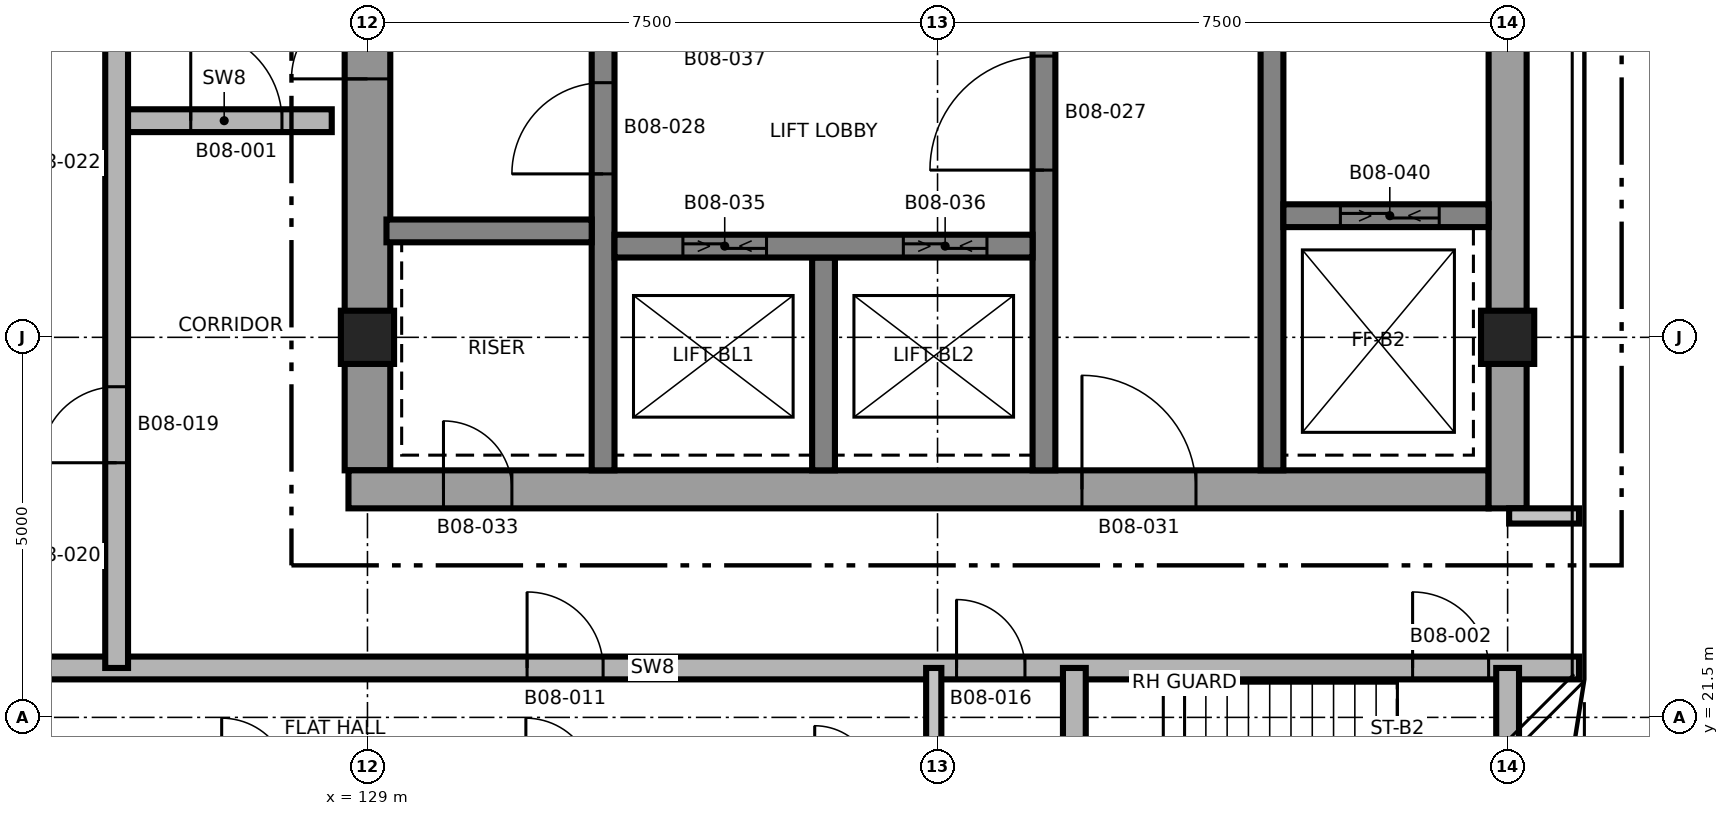
"""IFC4 building model, lengths in metres.
Left out: names, types, materials, properties, quantities, classifications, styles, units other than length and angle.
Written with IfcOpenShell. Run it as: python <this file> out.ifc"""

import sys

from ifc_helpers import new_model, si_unit, direction, frame, frame_2d, origin, origin_2d, place, context, subcontext, project, spatial, rectangle, extrude, element, fill, save


model = new_model("IFC4")
c1 = context("Model", 3, precision=1e-05, world=origin(), true_north=direction((0.0, 1.0)))
c2 = subcontext(c1, "Body", "Model", "MODEL_VIEW")
j1 = project(units=[si_unit("LENGTHUNIT", "METRE"), si_unit("PLANEANGLEUNIT", "RADIAN")], contexts=[c1])
p1 = place(None, origin())
s1 = spatial("IfcSite", under=j1, at=p1, CompositionType="ELEMENT")
p2 = place(p1, origin())
s2 = spatial("IfcBuilding", under=s1, at=p2, CompositionType="ELEMENT")
p3 = place(p2, frame((0.0, 0.0, 94.5)))
s3 = spatial("IfcBuildingStorey", under=s2, at=p3, CompositionType="ELEMENT", Elevation=94.5)
p4 = place(p3, frame((129.0, 24.75, 0.0), z_axis=(0.0, 0.0, 1.0), x_axis=(0.0, 1.0, 0.0)))
e1 = element("IfcWall", 1, at=p4, inside=s3, PredefinedType="SHEAR", context=c2, shape_type="SweptSolid", body=[
    extrude(rectangle(XDim=12.5, YDim=0.6, at=frame_2d((6.25, 0.0))), origin(), (0.0, 0.0, 1.0), 3.7),
])
p5 = place(p4, frame((5.15, 0.0, 0.0)))
e2 = element("IfcOpeningElement", 2, at=p5, cuts=e1, PredefinedType="OPENING", context=c2, shape_type="SweptSolid", body=[
    extrude(rectangle(XDim=1.0, YDim=2.1, at=frame_2d((0.5, 1.05))), frame((0.0, 0.31, 0.0), z_axis=(0.0, -1.0, 0.0), x_axis=(1.0, 0.0, 0.0)), (0.0, 0.0, 1.0), 0.62),
])
p6 = place(p3, frame((128.75, 24.5, 0.0), z_axis=(0.0, 0.0, 1.0), x_axis=(1.0, 0.0, 0.0)))
e3 = element("IfcWall", 3, at=p6, inside=s3, PredefinedType="SHEAR", context=c2, shape_type="SweptSolid", body=[
    extrude(rectangle(XDim=15.0, YDim=0.5, at=frame_2d((7.5, 0.0))), origin(), (0.0, 0.0, 1.0), 3.7),
])
p7 = place(p6, frame((9.65, 0.0, 0.0)))
e4 = element("IfcOpeningElement", 4, at=p7, cuts=e3, PredefinedType="OPENING", context=c2, shape_type="SweptSolid", body=[
    extrude(rectangle(XDim=1.5, YDim=2.1, at=frame_2d((0.75, 1.05))), frame((0.0, 0.26, 0.0), z_axis=(0.0, -1.0, 0.0), x_axis=(1.0, 0.0, 0.0)), (0.0, 0.0, 1.0), 0.52),
])
p8 = place(p6, frame((1.25, 0.0, 0.0)))
e5 = element("IfcOpeningElement", 5, at=p8, cuts=e3, PredefinedType="OPENING", context=c2, shape_type="SweptSolid", body=[
    extrude(rectangle(XDim=0.9, YDim=2.1, at=frame_2d((0.45, 1.05))), frame((0.0, 0.26, 0.0), z_axis=(0.0, -1.0, 0.0), x_axis=(1.0, 0.0, 0.0)), (0.0, 0.0, 1.0), 0.52),
])
p9 = place(p3, frame((144.0, 24.25, 0.0), z_axis=(0.0, 0.0, 1.0), x_axis=(0.0, 1.0, 0.0)))
e6 = element("IfcWall", 6, at=p9, inside=s3, PredefinedType="SHEAR", context=c2, shape_type="SweptSolid", body=[
    extrude(rectangle(XDim=13.5, YDim=0.5, at=frame_2d((6.75, 0.0))), origin(), (0.0, 0.0, 1.0), 3.7),
])
p10 = place(p3, frame((132.1, 24.75, 0.0), z_axis=(0.0, 0.0, 1.0), x_axis=(0.0, 1.0, 0.0)))
e7 = element("IfcWall", 7, at=p10, inside=s3, PredefinedType="SHEAR", context=c2, shape_type="SweptSolid", body=[
    extrude(rectangle(XDim=12.5, YDim=0.3, at=frame_2d((6.25, 0.0))), origin(), (0.0, 0.0, 1.0), 3.7),
])
p11 = place(p10, frame((3.9, 0.0, 0.0)))
e8 = element("IfcOpeningElement", 8, at=p11, cuts=e7, PredefinedType="OPENING", context=c2, shape_type="SweptSolid", body=[
    extrude(rectangle(XDim=1.2, YDim=2.1, at=frame_2d((0.6, 1.05))), frame((0.0, 0.16, 0.0), z_axis=(0.0, -1.0, 0.0), x_axis=(1.0, 0.0, 0.0)), (0.0, 0.0, 1.0), 0.32),
])
p12 = place(p3, frame((137.9, 24.75, 0.0), z_axis=(0.0, 0.0, 1.0), x_axis=(0.0, 1.0, 0.0)))
e9 = element("IfcWall", 9, at=p12, inside=s3, PredefinedType="SHEAR", context=c2, shape_type="SweptSolid", body=[
    extrude(rectangle(XDim=12.5, YDim=0.3, at=frame_2d((6.25, 0.0))), origin(), (0.0, 0.0, 1.0), 3.7),
])
p13 = place(p12, frame((3.95, 0.0, 0.0)))
e10 = element("IfcOpeningElement", 10, at=p13, cuts=e9, PredefinedType="OPENING", context=c2, shape_type="SweptSolid", body=[
    extrude(rectangle(XDim=1.5, YDim=2.1, at=frame_2d((0.75, 1.05))), frame((0.0, 0.16, 0.0), z_axis=(0.0, -1.0, 0.0), x_axis=(1.0, 0.0, 0.0)), (0.0, 0.0, 1.0), 0.32),
])
p14 = place(p12, frame((10.45, 0.0, 0.0)))
e11 = element("IfcOpeningElement", 11, at=p14, cuts=e9, PredefinedType="OPENING", context=c2, shape_type="SweptSolid", body=[
    extrude(rectangle(XDim=0.9, YDim=2.1, at=frame_2d((0.45, 1.05))), frame((0.0, 0.16, 0.0), z_axis=(0.0, -1.0, 0.0), x_axis=(1.0, 0.0, 0.0)), (0.0, 0.0, 1.0), 0.32),
])
p15 = place(p3, frame((140.9, 24.75, 0.0), z_axis=(0.0, 0.0, 1.0), x_axis=(0.0, 1.0, 0.0)))
e12 = element("IfcWall", 12, at=p15, inside=s3, PredefinedType="SHEAR", context=c2, shape_type="SweptSolid", body=[
    extrude(rectangle(XDim=12.5, YDim=0.3, at=frame_2d((6.25, 0.0))), origin(), (0.0, 0.0, 1.0), 3.7),
])
p16 = place(p15, frame((5.9, 0.0, 0.0)))
e13 = element("IfcOpeningElement", 13, at=p16, cuts=e12, PredefinedType="OPENING", context=c2, shape_type="SweptSolid", body=[
    extrude(rectangle(XDim=1.2, YDim=2.1, at=frame_2d((0.6, 1.05))), frame((0.0, 0.16, 0.0), z_axis=(0.0, -1.0, 0.0), x_axis=(1.0, 0.0, 0.0)), (0.0, 0.0, 1.0), 0.32),
])
p17 = place(p3, frame((135.0, 24.75, 0.0), z_axis=(0.0, 0.0, 1.0), x_axis=(0.0, 1.0, 0.0)))
e14 = element("IfcWall", 14, at=p17, inside=s3, PredefinedType="SHEAR", context=c2, shape_type="SweptSolid", body=[
    extrude(rectangle(XDim=2.8, YDim=0.3, at=frame_2d((1.4, 0.0))), origin(), (0.0, 0.0, 1.0), 3.7),
])
p18 = place(p3, frame((132.25, 27.7, 0.0), z_axis=(0.0, 0.0, 1.0), x_axis=(1.0, 0.0, 0.0)))
e15 = element("IfcWall", 15, at=p18, inside=s3, PredefinedType="SHEAR", context=c2, shape_type="SweptSolid", body=[
    extrude(rectangle(XDim=5.5, YDim=0.3, at=frame_2d((2.75, 0.0))), origin(), (0.0, 0.0, 1.0), 3.7),
])
p19 = place(p18, frame((0.9, 0.0, 0.0)))
e16 = element("IfcOpeningElement", 16, at=p19, cuts=e15, PredefinedType="OPENING", context=c2, shape_type="SweptSolid", body=[
    extrude(rectangle(XDim=1.1, YDim=2.4, at=frame_2d((0.55, 1.2))), frame((0.0, 0.16, 0.0), z_axis=(0.0, -1.0, 0.0), x_axis=(1.0, 0.0, 0.0)), (0.0, 0.0, 1.0), 0.32),
])
p20 = place(p18, frame((3.8, 0.0, 0.0)))
e17 = element("IfcOpeningElement", 17, at=p20, cuts=e15, PredefinedType="OPENING", context=c2, shape_type="SweptSolid", body=[
    extrude(rectangle(XDim=1.1, YDim=2.4, at=frame_2d((0.55, 1.2))), frame((0.0, 0.16, 0.0), z_axis=(0.0, -1.0, 0.0), x_axis=(1.0, 0.0, 0.0)), (0.0, 0.0, 1.0), 0.32),
])
p21 = place(p3, frame((129.25, 27.9, 0.0), z_axis=(0.0, 0.0, 1.0), x_axis=(1.0, 0.0, 0.0)))
e18 = element("IfcWall", 18, at=p21, inside=s3, PredefinedType="SHEAR", context=c2, shape_type="SweptSolid", body=[
    extrude(rectangle(XDim=2.7, YDim=0.3, at=frame_2d((1.35, 0.0))), origin(), (0.0, 0.0, 1.0), 3.7),
])
p22 = place(p3, frame((141.05, 28.1, 0.0), z_axis=(0.0, 0.0, 1.0), x_axis=(1.0, 0.0, 0.0)))
e19 = element("IfcWall", 19, at=p22, inside=s3, PredefinedType="SHEAR", context=c2, shape_type="SweptSolid", body=[
    extrude(rectangle(XDim=2.7, YDim=0.3, at=frame_2d((1.35, 0.0))), origin(), (0.0, 0.0, 1.0), 3.7),
])
p23 = place(p22, frame((0.75, 0.0, 0.0)))
e20 = element("IfcOpeningElement", 20, at=p23, cuts=e19, PredefinedType="OPENING", context=c2, shape_type="SweptSolid", body=[
    extrude(rectangle(XDim=1.3, YDim=2.4, at=frame_2d((0.65, 1.2))), frame((0.0, 0.16, 0.0), z_axis=(0.0, -1.0, 0.0), x_axis=(1.0, 0.0, 0.0)), (0.0, 0.0, 1.0), 0.32),
])
for number, where, z_axis, x_axis in (
    (21, (129.0, 26.5, 0.0), (0.0, 0.0, 1.0), (1.0, 0.0, 0.0)),
    (22, (144.0, 26.5, 0.0), (0.0, 0.0, 1.0), (1.0, 0.0, 0.0)),
):
    element("IfcColumn", number, at=place(p3, frame(where, z_axis=z_axis, x_axis=x_axis)), inside=s3, PredefinedType="COLUMN", context=c2, shape_type="SweptSolid", body=[
        extrude(rectangle(XDim=0.7, YDim=0.7, at=origin_2d()), origin(), (0.0, 0.0, 1.0), 3.7),
    ])
p24 = place(p3, frame((120.56, 22.15, 0.0), z_axis=(0.0, 0.0, 1.0), x_axis=(1.0, 0.0, 0.0)))
e23 = element("IfcWall", 23, at=p24, inside=s3, PredefinedType="SHEAR", context=c2, shape_type="SweptSolid", body=[
    extrude(rectangle(XDim=24.38, YDim=0.3, at=frame_2d((12.19, 0.0))), origin(), (0.0, 0.0, 1.0), 3.4),
])
p25 = place(p24, frame((22.19, 0.0, 0.0)))
e24 = element("IfcOpeningElement", 24, at=p25, cuts=e23, PredefinedType="OPENING", context=c2, shape_type="SweptSolid", body=[
    extrude(rectangle(XDim=1.0, YDim=2.1, at=frame_2d((0.5, 1.05))), frame((0.0, 0.16, 0.0), z_axis=(0.0, -1.0, 0.0), x_axis=(1.0, 0.0, 0.0)), (0.0, 0.0, 1.0), 0.32),
])
p26 = place(p24, frame((10.54, 0.0, 0.0)))
e25 = element("IfcOpeningElement", 25, at=p26, cuts=e23, PredefinedType="OPENING", context=c2, shape_type="SweptSolid", body=[
    extrude(rectangle(XDim=1.0, YDim=2.1, at=frame_2d((0.5, 1.05))), frame((0.0, 0.16, 0.0), z_axis=(0.0, -1.0, 0.0), x_axis=(1.0, 0.0, 0.0)), (0.0, 0.0, 1.0), 0.32),
])
p27 = place(p24, frame((16.19, 0.0, 0.0)))
e26 = element("IfcOpeningElement", 26, at=p27, cuts=e23, PredefinedType="OPENING", context=c2, shape_type="SweptSolid", body=[
    extrude(rectangle(XDim=0.9, YDim=2.1, at=frame_2d((0.45, 1.05))), frame((0.0, 0.16, 0.0), z_axis=(0.0, -1.0, 0.0), x_axis=(1.0, 0.0, 0.0)), (0.0, 0.0, 1.0), 0.32),
])
p28 = place(p3, frame((144.02, 24.15, 0.0), z_axis=(0.0, 0.0, 1.0), x_axis=(1.0, 0.0, 0.0)))
e27 = element("IfcWall", 27, at=p28, inside=s3, PredefinedType="PARTITIONING", context=c2, shape_type="SweptSolid", body=[
    extrude(rectangle(XDim=0.92, YDim=0.2, at=frame_2d((0.46, 0.0))), origin(), (0.0, 0.0, 1.0), 3.4),
])
p29 = place(p3, frame((125.7, 29.35, 0.0), z_axis=(0.0, 0.0, 1.0), x_axis=(1.0, 0.0, 0.0)))
e28 = element("IfcWall", 28, at=p29, inside=s3, PredefinedType="SHEAR", context=c2, shape_type="SweptSolid", body=[
    extrude(rectangle(XDim=2.83, YDim=0.3, at=frame_2d((1.415, 0.0))), origin(), (0.0, 0.0, 1.0), 3.4),
])
p30 = place(p29, frame((0.975, 0.0, 0.0)))
e29 = element("IfcOpeningElement", 29, at=p30, cuts=e28, PredefinedType="OPENING", context=c2, shape_type="SweptSolid", body=[
    extrude(rectangle(XDim=1.2, YDim=2.1, at=frame_2d((0.6, 1.05))), frame((0.0, 0.16, 0.0), z_axis=(0.0, -1.0, 0.0), x_axis=(1.0, 0.0, 0.0)), (0.0, 0.0, 1.0), 0.32),
])
p31 = place(p3, frame((125.7, 22.15, 0.0), z_axis=(0.0, 0.0, 1.0), x_axis=(0.0, 1.0, 0.0)))
e30 = element("IfcWall", 30, at=p31, inside=s3, PredefinedType="SHEAR", context=c2, shape_type="SweptSolid", body=[
    extrude(rectangle(XDim=17.7, YDim=0.3, at=frame_2d((8.85, 0.0))), origin(), (0.0, 0.0, 1.0), 3.4),
])
p32 = place(p31, frame((2.7, 0.0, 0.0)))
e31 = element("IfcOpeningElement", 31, at=p32, cuts=e30, PredefinedType="OPENING", context=c2, shape_type="SweptSolid", body=[
    extrude(rectangle(XDim=1.0, YDim=2.1, at=frame_2d((0.5, 1.05))), frame((0.0, 0.16, 0.0), z_axis=(0.0, -1.0, 0.0), x_axis=(1.0, 0.0, 0.0)), (0.0, 0.0, 1.0), 0.32),
])
p33 = place(p3, frame((136.45, 16.56, 0.0), z_axis=(0.0, 0.0, 1.0), x_axis=(0.0, 1.0, 0.0)))
e32 = element("IfcWall", 32, at=p33, inside=s3, PredefinedType="PARTITIONING", context=c2, shape_type="SweptSolid", body=[
    extrude(rectangle(XDim=5.59, YDim=0.2, at=frame_2d((2.795, 0.0))), origin(), (0.0, 0.0, 1.0), 3.4),
])
p34 = place(p3, frame((138.3, 16.56, 0.0), z_axis=(0.0, 0.0, 1.0), x_axis=(0.0, 1.0, 0.0)))
e33 = element("IfcWall", 33, at=p34, inside=s3, PredefinedType="SHEAR", context=c2, shape_type="SweptSolid", body=[
    extrude(rectangle(XDim=5.59, YDim=0.3, at=frame_2d((2.795, 0.0))), origin(), (0.0, 0.0, 1.0), 3.4),
])
p35 = place(p34, frame((1.54, 0.0, 0.0)))
e34 = element("IfcOpeningElement", 34, at=p35, cuts=e33, PredefinedType="OPENING", context=c2, shape_type="SweptSolid", body=[
    extrude(rectangle(XDim=0.8, YDim=2.1, at=frame_2d((0.4, 1.05))), frame((0.0, 0.16, 0.0), z_axis=(0.0, -1.0, 0.0), x_axis=(1.0, 0.0, 0.0)), (0.0, 0.0, 1.0), 0.32),
])
p36 = place(p3, frame((144.0, 18.999, 0.0), z_axis=(0.0, 0.0, 1.0), x_axis=(0.0, 1.0, 0.0)))
e35 = element("IfcWall", 35, at=p36, inside=s3, PredefinedType="SHEAR", context=c2, shape_type="SweptSolid", body=[
    extrude(rectangle(XDim=3.151, YDim=0.3, at=frame_2d((1.575, 0.0))), origin(), (0.0, 0.0, 1.0), 3.4),
])
p37 = place(p30, origin())
e36 = element("IfcDoor", 36, at=p37, inside=s3, OperationType="SINGLE_SWING_LEFT", PredefinedType="DOOR", context=c2, shape_type="SweptSolid", body=[
    extrude(rectangle(XDim=1.2, YDim=2.1, at=frame_2d((0.6, 1.05))), frame((0.0, 0.025, 0.0), z_axis=(0.0, -1.0, 0.0), x_axis=(1.0, 0.0, 0.0)), (0.0, 0.0, 1.0), 0.05),
])
fill(e29, e36)
p38 = place(p25, origin())
e37 = element("IfcDoor", 37, at=p38, inside=s3, OperationType="SINGLE_SWING_RIGHT", PredefinedType="DOOR", context=c2, shape_type="SweptSolid", body=[
    extrude(rectangle(XDim=1.0, YDim=2.1, at=frame_2d((0.5, 1.05))), frame((0.0, 0.025, 0.0), z_axis=(0.0, -1.0, 0.0), x_axis=(1.0, 0.0, 0.0)), (0.0, 0.0, 1.0), 0.05),
])
fill(e24, e37)
p39 = place(p26, origin())
e38 = element("IfcDoor", 38, at=p39, inside=s3, OperationType="SINGLE_SWING_LEFT", PredefinedType="DOOR", context=c2, shape_type="SweptSolid", body=[
    extrude(rectangle(XDim=1.0, YDim=2.1, at=frame_2d((0.5, 1.05))), frame((0.0, 0.025, 0.0), z_axis=(0.0, -1.0, 0.0), x_axis=(1.0, 0.0, 0.0)), (0.0, 0.0, 1.0), 0.05),
])
fill(e25, e38)
p40 = place(p27, origin())
e39 = element("IfcDoor", 39, at=p40, inside=s3, OperationType="SINGLE_SWING_RIGHT", PredefinedType="DOOR", context=c2, shape_type="SweptSolid", body=[
    extrude(rectangle(XDim=0.9, YDim=2.1, at=frame_2d((0.45, 1.05))), frame((0.0, 0.025, 0.0), z_axis=(0.0, -1.0, 0.0), x_axis=(1.0, 0.0, 0.0)), (0.0, 0.0, 1.0), 0.05),
])
fill(e26, e39)
p41 = place(p32, origin())
e40 = element("IfcDoor", 40, at=p41, inside=s3, OperationType="SINGLE_SWING_LEFT", PredefinedType="DOOR", context=c2, shape_type="SweptSolid", body=[
    extrude(rectangle(XDim=1.0, YDim=2.1, at=frame_2d((0.5, 1.05))), frame((0.0, 0.025, 0.0), z_axis=(0.0, -1.0, 0.0), x_axis=(1.0, 0.0, 0.0)), (0.0, 0.0, 1.0), 0.05),
])
fill(e31, e40)
p42 = place(p13, origin())
e41 = element("IfcDoor", 41, at=p42, inside=s3, OperationType="SINGLE_SWING_RIGHT", PredefinedType="DOOR", context=c2, shape_type="SweptSolid", body=[
    extrude(rectangle(XDim=1.5, YDim=2.1, at=frame_2d((0.75, 1.05))), frame((0.0, 0.025, 0.0), z_axis=(0.0, -1.0, 0.0), x_axis=(1.0, 0.0, 0.0)), (0.0, 0.0, 1.0), 0.05),
])
fill(e10, e41)
p43 = place(p11, origin())
e42 = element("IfcDoor", 42, at=p43, inside=s3, OperationType="SINGLE_SWING_LEFT", PredefinedType="DOOR", context=c2, shape_type="SweptSolid", body=[
    extrude(rectangle(XDim=1.2, YDim=2.1, at=frame_2d((0.6, 1.05))), frame((0.0, 0.025, 0.0), z_axis=(0.0, -1.0, 0.0), x_axis=(1.0, 0.0, 0.0)), (0.0, 0.0, 1.0), 0.05),
])
fill(e8, e42)
p44 = place(p5, origin())
e43 = element("IfcDoor", 43, at=p44, inside=s3, OperationType="SINGLE_SWING_RIGHT", PredefinedType="DOOR", context=c2, shape_type="SweptSolid", body=[
    extrude(rectangle(XDim=1.0, YDim=2.1, at=frame_2d((0.5, 1.05))), frame((0.0, 0.025, 0.0), z_axis=(0.0, -1.0, 0.0), x_axis=(1.0, 0.0, 0.0)), (0.0, 0.0, 1.0), 0.05),
])
fill(e2, e43)
p45 = place(p7, origin())
e44 = element("IfcDoor", 44, at=p45, inside=s3, OperationType="SINGLE_SWING_LEFT", PredefinedType="DOOR", context=c2, shape_type="SweptSolid", body=[
    extrude(rectangle(XDim=1.5, YDim=2.1, at=frame_2d((0.75, 1.05))), frame((0.0, 0.025, 0.0), z_axis=(0.0, -1.0, 0.0), x_axis=(1.0, 0.0, 0.0)), (0.0, 0.0, 1.0), 0.05),
])
fill(e4, e44)
p46 = place(p8, origin())
e45 = element("IfcDoor", 45, at=p46, inside=s3, OperationType="SINGLE_SWING_LEFT", PredefinedType="DOOR", context=c2, shape_type="SweptSolid", body=[
    extrude(rectangle(XDim=0.9, YDim=2.1, at=frame_2d((0.45, 1.05))), frame((0.0, 0.025, 0.0), z_axis=(0.0, -1.0, 0.0), x_axis=(1.0, 0.0, 0.0)), (0.0, 0.0, 1.0), 0.05),
])
fill(e5, e45)
p47 = place(p19, origin())
e46 = element("IfcDoor", 46, at=p47, inside=s3, OperationType="SLIDING_TO_LEFT", PredefinedType="DOOR", context=c2, shape_type="SweptSolid", body=[
    extrude(rectangle(XDim=1.1, YDim=2.4, at=frame_2d((0.55, 1.2))), frame((0.0, 0.025, 0.0), z_axis=(0.0, -1.0, 0.0), x_axis=(1.0, 0.0, 0.0)), (0.0, 0.0, 1.0), 0.05),
])
fill(e16, e46)
p48 = place(p20, origin())
e47 = element("IfcDoor", 47, at=p48, inside=s3, OperationType="SLIDING_TO_LEFT", PredefinedType="DOOR", context=c2, shape_type="SweptSolid", body=[
    extrude(rectangle(XDim=1.1, YDim=2.4, at=frame_2d((0.55, 1.2))), frame((0.0, 0.025, 0.0), z_axis=(0.0, -1.0, 0.0), x_axis=(1.0, 0.0, 0.0)), (0.0, 0.0, 1.0), 0.05),
])
fill(e17, e47)
p49 = place(p23, origin())
e48 = element("IfcDoor", 48, at=p49, inside=s3, OperationType="SLIDING_TO_LEFT", PredefinedType="DOOR", context=c2, shape_type="SweptSolid", body=[
    extrude(rectangle(XDim=1.3, YDim=2.4, at=frame_2d((0.65, 1.2))), frame((0.0, 0.025, 0.0), z_axis=(0.0, -1.0, 0.0), x_axis=(1.0, 0.0, 0.0)), (0.0, 0.0, 1.0), 0.05),
])
fill(e20, e48)
save(model, sys.argv[1])
